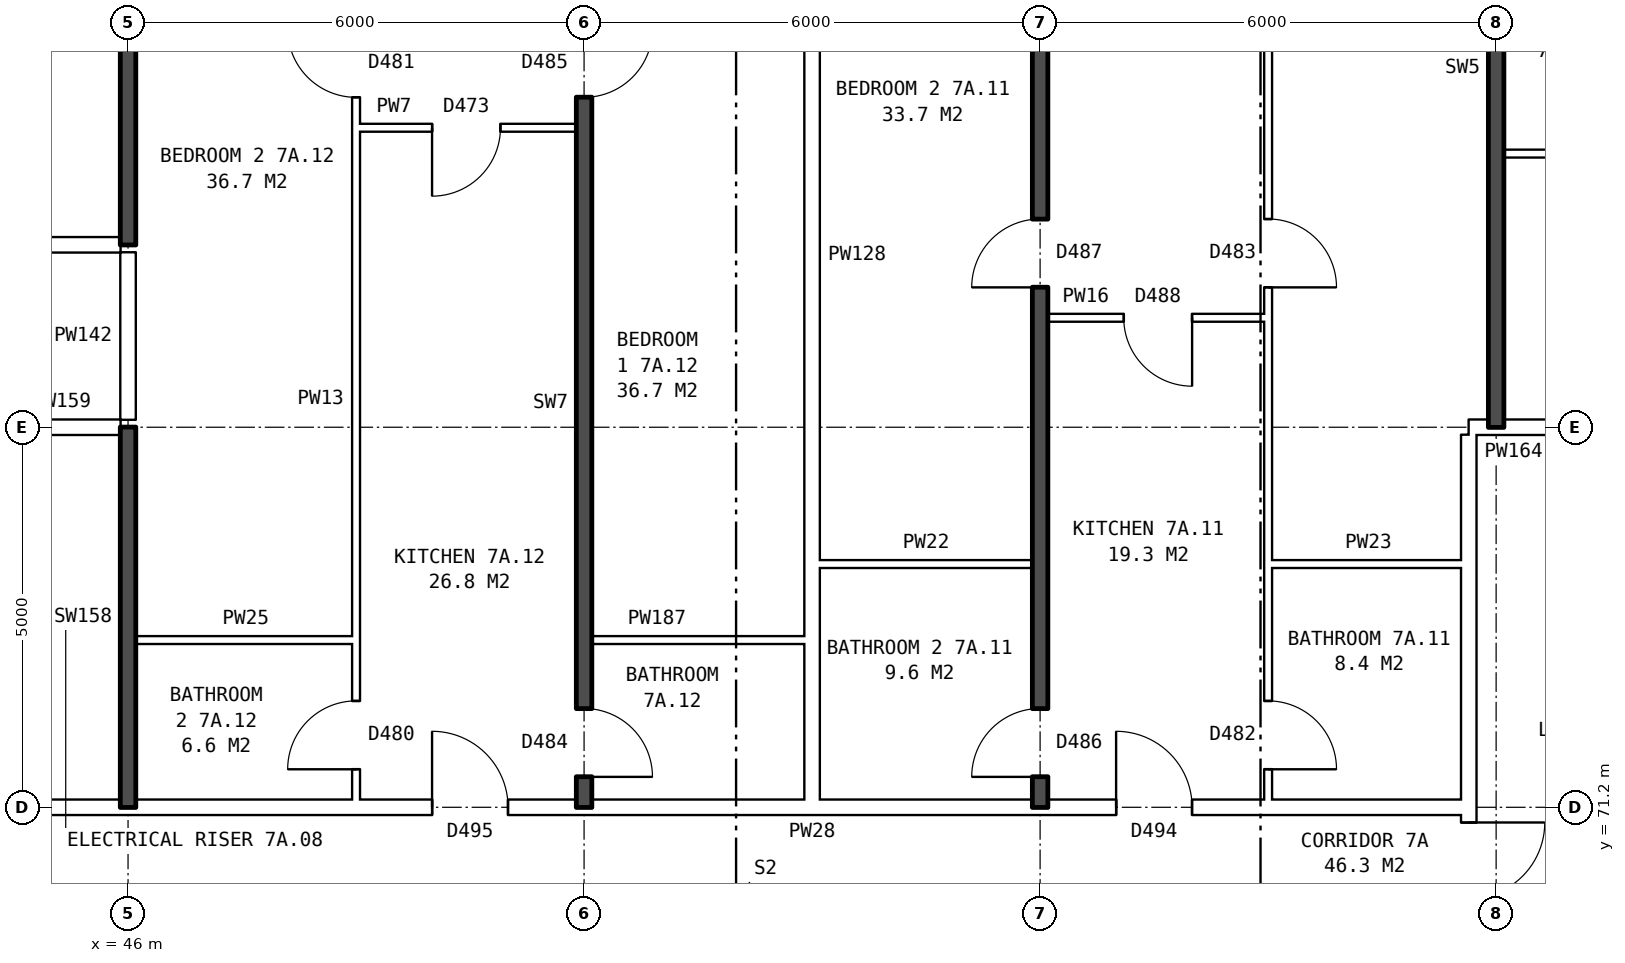
"""IFC4 building model, lengths in metres.
Left out: names, types, materials, properties, quantities, classifications, styles, units other than length and angle.
Written with IfcOpenShell. Run it as: python <this file> out.ifc"""

import sys

from ifc_helpers import new_model, si_unit, direction, frame, frame_2d, origin, place, context, subcontext, project, spatial, rectangle, extrude, element, fill, save


model = new_model("IFC4")
c1 = context("Model", 3, precision=1e-05, world=origin(), true_north=direction((0.0, 1.0)))
c2 = subcontext(c1, "Body", "Model", "MODEL_VIEW")
j1 = project(units=[si_unit("LENGTHUNIT", "METRE"), si_unit("PLANEANGLEUNIT", "RADIAN")], contexts=[c1])
p1 = place(None, origin())
s1 = spatial("IfcSite", under=j1, at=p1, CompositionType="ELEMENT")
p2 = place(p1, origin())
s2 = spatial("IfcBuilding", under=s1, at=p2, CompositionType="ELEMENT")
p3 = place(p2, frame((0.0, 0.0, 28.8)))
s3 = spatial("IfcBuildingStorey", under=s2, at=p3, CompositionType="ELEMENT", Elevation=28.8)
p4 = place(p3, frame((63.64, 63.9, 0.0), z_axis=(0.0, 0.0, 1.0), x_axis=(0.0, 1.0, 0.0)))
e1 = element("IfcWall", 1, at=p4, inside=s3, PredefinedType="PARTITIONING", context=c2, shape_type="SweptSolid", body=[
    extrude(rectangle(XDim=12.2, YDim=0.2, at=frame_2d((6.1, 0.0))), origin(), (0.0, 0.0, 1.0), 2.85),
])
p5 = place(p4, frame((5.1, 0.0, 0.0)))
e2 = element("IfcOpeningElement", 2, at=p5, cuts=e1, PredefinedType="OPENING", context=c2, shape_type="SweptSolid", body=[
    extrude(rectangle(XDim=2.0, YDim=2.1, at=frame_2d((1.0, 1.05))), frame((0.0, 0.11, 0.0), z_axis=(0.0, -1.0, 0.0), x_axis=(1.0, 0.0, 0.0)), (0.0, 0.0, 1.0), 0.22),
])
p6 = place(p3, frame((44.36, 71.2, 0.0), z_axis=(0.0, 0.0, 1.0), x_axis=(1.0, 0.0, 0.0)))
e3 = element("IfcWall", 3, at=p6, inside=s3, PredefinedType="PARTITIONING", context=c2, shape_type="SweptSolid", body=[
    extrude(rectangle(XDim=19.28, YDim=0.2, at=frame_2d((9.64, 0.0))), origin(), (0.0, 0.0, 1.0), 2.85),
])
p7 = place(p6, frame((14.64, 0.0, 0.0)))
e4 = element("IfcOpeningElement", 4, at=p7, cuts=e3, PredefinedType="OPENING", context=c2, shape_type="SweptSolid", body=[
    extrude(rectangle(XDim=1.0, YDim=2.1, at=frame_2d((0.5, 1.05))), frame((0.0, 0.11, 0.0), z_axis=(0.0, -1.0, 0.0), x_axis=(1.0, 0.0, 0.0)), (0.0, 0.0, 1.0), 0.22),
])
p8 = place(p6, frame((5.64, 0.0, 0.0)))
e5 = element("IfcOpeningElement", 5, at=p8, cuts=e3, PredefinedType="OPENING", context=c2, shape_type="SweptSolid", body=[
    extrude(rectangle(XDim=1.0, YDim=2.1, at=frame_2d((0.5, 1.05))), frame((0.0, 0.11, 0.0), z_axis=(0.0, -1.0, 0.0), x_axis=(1.0, 0.0, 0.0)), (0.0, 0.0, 1.0), 0.22),
])
p9 = place(p3, frame((46.1, 73.4, 0.0), z_axis=(0.0, 0.0, 1.0), x_axis=(1.0, 0.0, 0.0)))
e6 = element("IfcWall", 6, at=p9, inside=s3, PredefinedType="PARTITIONING", context=c2, shape_type="SweptSolid", body=[
    extrude(rectangle(XDim=2.9, YDim=0.1, at=frame_2d((1.45, 0.0))), origin(), (0.0, 0.0, 1.0), 2.85),
])
for number, where, z_axis, x_axis in (
    (7, (52.1, 73.4, 0.0), (0.0, 0.0, 1.0), (1.0, 0.0, 0.0)),
    (8, (55.1, 74.4, 0.0), (0.0, 0.0, 1.0), (1.0, 0.0, 0.0)),
):
    element("IfcWall", number, at=place(p3, frame(where, z_axis=z_axis, x_axis=x_axis)), inside=s3, PredefinedType="PARTITIONING", context=c2, shape_type="SweptSolid", body=[
        extrude(rectangle(XDim=2.8, YDim=0.1, at=frame_2d((1.4, 0.0))), origin(), (0.0, 0.0, 1.0), 2.85),
    ])
p10 = place(p3, frame((61.0, 74.4, 0.0), z_axis=(0.0, 0.0, 1.0), x_axis=(1.0, 0.0, 0.0)))
e9 = element("IfcWall", 9, at=p10, inside=s3, PredefinedType="PARTITIONING", context=c2, shape_type="SweptSolid", body=[
    extrude(rectangle(XDim=2.64, YDim=0.1, at=frame_2d((1.32, 0.0))), origin(), (0.0, 0.0, 1.0), 2.85),
])
p11 = place(p3, frame((44.36, 76.2, 0.0), z_axis=(0.0, 0.0, 1.0), x_axis=(1.0, 0.0, 0.0)))
e10 = element("IfcWall", 10, at=p11, inside=s3, PredefinedType="PARTITIONING", context=c2, shape_type="SweptSolid", body=[
    extrude(rectangle(XDim=1.54, YDim=0.2, at=frame_2d((0.77, 0.0))), origin(), (0.0, 0.0, 1.0), 2.85),
])
p12 = place(p3, frame((63.64, 76.2, 0.0), z_axis=(0.0, 0.0, 1.0), x_axis=(1.0, 0.0, 0.0)))
e11 = element("IfcWall", 11, at=p12, inside=s3, PredefinedType="PARTITIONING", context=c2, shape_type="SweptSolid", body=[
    extrude(rectangle(XDim=3.0, YDim=0.2, at=frame_2d((1.5, 0.0))), origin(), (0.0, 0.0, 1.0), 2.85),
])
p13 = place(p12, frame((1.18, 0.0, 0.0)))
e12 = element("IfcOpeningElement", 12, at=p13, cuts=e11, PredefinedType="OPENING", context=c2, shape_type="SweptSolid", body=[
    extrude(rectangle(XDim=1.0, YDim=2.1, at=frame_2d((0.5, 1.05))), frame((0.0, 0.11, 0.0), z_axis=(0.0, -1.0, 0.0), x_axis=(1.0, 0.0, 0.0)), (0.0, 0.0, 1.0), 0.22),
])
p14 = place(p3, frame((58.1, 77.64, 0.0), z_axis=(0.0, 0.0, 1.0), x_axis=(1.0, 0.0, 0.0)))
e13 = element("IfcWall", 13, at=p14, inside=s3, PredefinedType="PARTITIONING", context=c2, shape_type="SweptSolid", body=[
    extrude(rectangle(XDim=2.9, YDim=0.1, at=frame_2d((1.45, 0.0))), origin(), (0.0, 0.0, 1.0), 2.85),
])
p15 = place(p14, frame((1.0, 0.0, 0.0)))
e14 = element("IfcOpeningElement", 14, at=p15, cuts=e13, PredefinedType="OPENING", context=c2, shape_type="SweptSolid", body=[
    extrude(rectangle(XDim=0.9, YDim=2.1, at=frame_2d((0.45, 1.05))), frame((0.0, 0.06, 0.0), z_axis=(0.0, -1.0, 0.0), x_axis=(1.0, 0.0, 0.0)), (0.0, 0.0, 1.0), 0.12),
])
p16 = place(p3, frame((20.11, 78.6, 0.0), z_axis=(0.0, 0.0, 1.0), x_axis=(1.0, 0.0, 0.0)))
e15 = element("IfcWall", 15, at=p16, inside=s3, PredefinedType="PARTITIONING", context=c2, shape_type="SweptSolid", body=[
    extrude(rectangle(XDim=25.79, YDim=0.2, at=frame_2d((12.895, 0.0))), origin(), (0.0, 0.0, 1.0), 2.85),
])
p17 = place(p16, frame((22.34, 0.0, 0.0)))
e16 = element("IfcOpeningElement", 16, at=p17, cuts=e15, PredefinedType="OPENING", context=c2, shape_type="SweptSolid", body=[
    extrude(rectangle(XDim=1.0, YDim=2.1, at=frame_2d((0.5, 1.05))), frame((0.0, 0.11, 0.0), z_axis=(0.0, -1.0, 0.0), x_axis=(1.0, 0.0, 0.0)), (0.0, 0.0, 1.0), 0.22),
])
p18 = place(p16, frame((10.39, 0.0, 0.0)))
e17 = element("IfcOpeningElement", 17, at=p18, cuts=e15, PredefinedType="OPENING", context=c2, shape_type="SweptSolid", body=[
    extrude(rectangle(XDim=1.0, YDim=2.1, at=frame_2d((0.5, 1.05))), frame((0.0, 0.11, 0.0), z_axis=(0.0, -1.0, 0.0), x_axis=(1.0, 0.0, 0.0)), (0.0, 0.0, 1.0), 0.22),
])
p19 = place(p16, frame((2.245, 0.0, 0.0)))
e18 = element("IfcOpeningElement", 18, at=p19, cuts=e15, PredefinedType="OPENING", context=c2, shape_type="SweptSolid", body=[
    extrude(rectangle(XDim=1.0, YDim=2.1, at=frame_2d((0.5, 1.05))), frame((0.0, 0.11, 0.0), z_axis=(0.0, -1.0, 0.0), x_axis=(1.0, 0.0, 0.0)), (0.0, 0.0, 1.0), 0.22),
])
p20 = place(p3, frame((64.1, 79.8, 0.0), z_axis=(0.0, 0.0, 1.0), x_axis=(1.0, 0.0, 0.0)))
e19 = element("IfcWall", 19, at=p20, inside=s3, PredefinedType="PARTITIONING", context=c2, shape_type="SweptSolid", body=[
    extrude(rectangle(XDim=5.8, YDim=0.1, at=frame_2d((2.9, 0.0))), origin(), (0.0, 0.0, 1.0), 2.85),
])
p21 = place(p20, frame((3.6, 0.0, 0.0)))
e20 = element("IfcOpeningElement", 20, at=p21, cuts=e19, PredefinedType="OPENING", context=c2, shape_type="SweptSolid", body=[
    extrude(rectangle(XDim=0.9, YDim=2.1, at=frame_2d((0.45, 1.05))), frame((0.0, 0.06, 0.0), z_axis=(0.0, -1.0, 0.0), x_axis=(1.0, 0.0, 0.0)), (0.0, 0.0, 1.0), 0.12),
])
p22 = place(p20, frame((0.7, 0.0, 0.0)))
e21 = element("IfcOpeningElement", 21, at=p22, cuts=e19, PredefinedType="OPENING", context=c2, shape_type="SweptSolid", body=[
    extrude(rectangle(XDim=0.9, YDim=2.1, at=frame_2d((0.45, 1.05))), frame((0.0, 0.06, 0.0), z_axis=(0.0, -1.0, 0.0), x_axis=(1.0, 0.0, 0.0)), (0.0, 0.0, 1.0), 0.12),
])
p23 = place(p3, frame((49.0, 80.14, 0.0), z_axis=(0.0, 0.0, 1.0), x_axis=(1.0, 0.0, 0.0)))
e22 = element("IfcWall", 22, at=p23, inside=s3, PredefinedType="PARTITIONING", context=c2, shape_type="SweptSolid", body=[
    extrude(rectangle(XDim=2.9, YDim=0.1, at=frame_2d((1.45, 0.0))), origin(), (0.0, 0.0, 1.0), 2.85),
])
p24 = place(p23, frame((1.0, 0.0, 0.0)))
e23 = element("IfcOpeningElement", 23, at=p24, cuts=e22, PredefinedType="OPENING", context=c2, shape_type="SweptSolid", body=[
    extrude(rectangle(XDim=0.9, YDim=2.1, at=frame_2d((0.45, 1.05))), frame((0.0, 0.06, 0.0), z_axis=(0.0, -1.0, 0.0), x_axis=(1.0, 0.0, 0.0)), (0.0, 0.0, 1.0), 0.12),
])
p25 = place(p3, frame((46.0, 71.2, 0.0), z_axis=(0.0, 0.0, 1.0), x_axis=(0.0, 1.0, 0.0)))
e24 = element("IfcWall", 24, at=p25, inside=s3, PredefinedType="SOLIDWALL", context=c2, shape_type="SweptSolid", body=[
    extrude(rectangle(XDim=5.0, YDim=0.2, at=frame_2d((2.5, 0.0))), origin(), (0.0, 0.0, 1.0), 2.85),
])
p26 = place(p3, frame((46.0, 76.3, 0.0), z_axis=(0.0, 0.0, 1.0), x_axis=(0.0, 1.0, 0.0)))
e25 = element("IfcWall", 25, at=p26, inside=s3, PredefinedType="PARTITIONING", context=c2, shape_type="SweptSolid", body=[
    extrude(rectangle(XDim=2.2, YDim=0.2, at=frame_2d((1.1, 0.0))), origin(), (0.0, 0.0, 1.0), 2.85),
])
p27 = place(p3, frame((46.0, 78.6, 0.0), z_axis=(0.0, 0.0, 1.0), x_axis=(0.0, 1.0, 0.0)))
e26 = element("IfcWall", 26, at=p27, inside=s3, PredefinedType="SOLIDWALL", context=c2, shape_type="SweptSolid", body=[
    extrude(rectangle(XDim=7.04, YDim=0.2, at=frame_2d((3.52, 0.0))), origin(), (0.0, 0.0, 1.0), 2.85),
])
p28 = place(p3, frame((49.0, 71.3, 0.0), z_axis=(0.0, 0.0, 1.0), x_axis=(0.0, 1.0, 0.0)))
e27 = element("IfcWall", 27, at=p28, inside=s3, PredefinedType="PARTITIONING", context=c2, shape_type="SweptSolid", body=[
    extrude(rectangle(XDim=14.34, YDim=0.1, at=frame_2d((7.17, 0.0))), origin(), (0.0, 0.0, 1.0), 2.85),
])
p29 = place(p28, frame((9.24, 0.0, 0.0)))
e28 = element("IfcOpeningElement", 28, at=p29, cuts=e27, PredefinedType="OPENING", context=c2, shape_type="SweptSolid", body=[
    extrude(rectangle(XDim=0.9, YDim=2.1, at=frame_2d((0.45, 1.05))), frame((0.0, 0.06, 0.0), z_axis=(0.0, -1.0, 0.0), x_axis=(1.0, 0.0, 0.0)), (0.0, 0.0, 1.0), 0.12),
])
p30 = place(p28, frame((0.4, 0.0, 0.0)))
e29 = element("IfcOpeningElement", 29, at=p30, cuts=e27, PredefinedType="OPENING", context=c2, shape_type="SweptSolid", body=[
    extrude(rectangle(XDim=0.9, YDim=2.1, at=frame_2d((0.45, 1.05))), frame((0.0, 0.06, 0.0), z_axis=(0.0, -1.0, 0.0), x_axis=(1.0, 0.0, 0.0)), (0.0, 0.0, 1.0), 0.12),
])
p31 = place(p3, frame((52.0, 71.2, 0.0), z_axis=(0.0, 0.0, 1.0), x_axis=(0.0, 1.0, 0.0)))
e30 = element("IfcWall", 30, at=p31, inside=s3, PredefinedType="SOLIDWALL", context=c2, shape_type="SweptSolid", body=[
    extrude(rectangle(XDim=14.44, YDim=0.2, at=frame_2d((7.22, 0.0))), origin(), (0.0, 0.0, 1.0), 2.85),
])
p32 = place(p31, frame((9.34, 0.0, 0.0)))
e31 = element("IfcOpeningElement", 31, at=p32, cuts=e30, PredefinedType="OPENING", context=c2, shape_type="SweptSolid", body=[
    extrude(rectangle(XDim=0.9, YDim=2.1, at=frame_2d((0.45, 1.05))), frame((0.0, 0.11, 0.0), z_axis=(0.0, -1.0, 0.0), x_axis=(1.0, 0.0, 0.0)), (0.0, 0.0, 1.0), 0.22),
])
p33 = place(p31, frame((0.4, 0.0, 0.0)))
e32 = element("IfcOpeningElement", 32, at=p33, cuts=e30, PredefinedType="OPENING", context=c2, shape_type="SweptSolid", body=[
    extrude(rectangle(XDim=0.9, YDim=2.1, at=frame_2d((0.45, 1.05))), frame((0.0, 0.11, 0.0), z_axis=(0.0, -1.0, 0.0), x_axis=(1.0, 0.0, 0.0)), (0.0, 0.0, 1.0), 0.22),
])
p34 = place(p3, frame((55.0, 71.3, 0.0), z_axis=(0.0, 0.0, 1.0), x_axis=(0.0, 1.0, 0.0)))
e33 = element("IfcWall", 33, at=p34, inside=s3, PredefinedType="PARTITIONING", context=c2, shape_type="SweptSolid", body=[
    extrude(rectangle(XDim=14.34, YDim=0.2, at=frame_2d((7.17, 0.0))), origin(), (0.0, 0.0, 1.0), 2.85),
])
p35 = place(p3, frame((58.0, 71.2, 0.0), z_axis=(0.0, 0.0, 1.0), x_axis=(0.0, 1.0, 0.0)))
e34 = element("IfcWall", 34, at=p35, inside=s3, PredefinedType="SOLIDWALL", context=c2, shape_type="SweptSolid", body=[
    extrude(rectangle(XDim=14.44, YDim=0.2, at=frame_2d((7.22, 0.0))), origin(), (0.0, 0.0, 1.0), 2.85),
])
p36 = place(p35, frame((6.84, 0.0, 0.0)))
e35 = element("IfcOpeningElement", 35, at=p36, cuts=e34, PredefinedType="OPENING", context=c2, shape_type="SweptSolid", body=[
    extrude(rectangle(XDim=0.9, YDim=2.1, at=frame_2d((0.45, 1.05))), frame((0.0, 0.11, 0.0), z_axis=(0.0, -1.0, 0.0), x_axis=(1.0, 0.0, 0.0)), (0.0, 0.0, 1.0), 0.22),
])
p37 = place(p35, frame((0.4, 0.0, 0.0)))
e36 = element("IfcOpeningElement", 36, at=p37, cuts=e34, PredefinedType="OPENING", context=c2, shape_type="SweptSolid", body=[
    extrude(rectangle(XDim=0.9, YDim=2.1, at=frame_2d((0.45, 1.05))), frame((0.0, 0.11, 0.0), z_axis=(0.0, -1.0, 0.0), x_axis=(1.0, 0.0, 0.0)), (0.0, 0.0, 1.0), 0.22),
])
p38 = place(p3, frame((61.0, 71.3, 0.0), z_axis=(0.0, 0.0, 1.0), x_axis=(0.0, 1.0, 0.0)))
e37 = element("IfcWall", 37, at=p38, inside=s3, PredefinedType="PARTITIONING", context=c2, shape_type="SweptSolid", body=[
    extrude(rectangle(XDim=14.34, YDim=0.1, at=frame_2d((7.17, 0.0))), origin(), (0.0, 0.0, 1.0), 2.85),
])
p39 = place(p38, frame((6.74, 0.0, 0.0)))
e38 = element("IfcOpeningElement", 38, at=p39, cuts=e37, PredefinedType="OPENING", context=c2, shape_type="SweptSolid", body=[
    extrude(rectangle(XDim=0.9, YDim=2.1, at=frame_2d((0.45, 1.05))), frame((0.0, 0.06, 0.0), z_axis=(0.0, -1.0, 0.0), x_axis=(1.0, 0.0, 0.0)), (0.0, 0.0, 1.0), 0.12),
])
p40 = place(p38, frame((0.4, 0.0, 0.0)))
e39 = element("IfcOpeningElement", 39, at=p40, cuts=e37, PredefinedType="OPENING", context=c2, shape_type="SweptSolid", body=[
    extrude(rectangle(XDim=0.9, YDim=2.1, at=frame_2d((0.45, 1.05))), frame((0.0, 0.06, 0.0), z_axis=(0.0, -1.0, 0.0), x_axis=(1.0, 0.0, 0.0)), (0.0, 0.0, 1.0), 0.12),
])
p41 = place(p3, frame((64.0, 76.2, 0.0), z_axis=(0.0, 0.0, 1.0), x_axis=(0.0, 1.0, 0.0)))
e40 = element("IfcWall", 40, at=p41, inside=s3, PredefinedType="SOLIDWALL", context=c2, shape_type="SweptSolid", body=[
    extrude(rectangle(XDim=9.44, YDim=0.2, at=frame_2d((4.72, 0.0))), origin(), (0.0, 0.0, 1.0), 2.85),
])
p42 = place(p5, frame((2.0, 0.0, 0.0), z_axis=(0.0, 0.0, 1.0), x_axis=(-1.0, 0.0, 0.0)))
e41 = element("IfcDoor", 41, at=p42, inside=s3, OperationType="DOUBLE_DOOR_SINGLE_SWING", PredefinedType="DOOR", context=c2, shape_type="SweptSolid", body=[
    extrude(rectangle(XDim=2.0, YDim=2.1, at=frame_2d((1.0, 1.05))), frame((0.0, 0.025, 0.0), z_axis=(0.0, -1.0, 0.0), x_axis=(1.0, 0.0, 0.0)), (0.0, 0.0, 1.0), 0.05),
])
fill(e2, e41)
p43 = place(p39, frame((0.9, 0.0, 0.0), z_axis=(0.0, 0.0, 1.0), x_axis=(-1.0, 0.0, 0.0)))
e42 = element("IfcDoor", 42, at=p43, inside=s3, OperationType="SINGLE_SWING_RIGHT", PredefinedType="DOOR", context=c2, shape_type="SweptSolid", body=[
    extrude(rectangle(XDim=0.9, YDim=2.1, at=frame_2d((0.45, 1.05))), frame((0.0, 0.025, 0.0), z_axis=(0.0, -1.0, 0.0), x_axis=(1.0, 0.0, 0.0)), (0.0, 0.0, 1.0), 0.05),
])
fill(e38, e42)
p44 = place(p36, origin())
e43 = element("IfcDoor", 43, at=p44, inside=s3, OperationType="SINGLE_SWING_LEFT", PredefinedType="DOOR", context=c2, shape_type="SweptSolid", body=[
    extrude(rectangle(XDim=0.9, YDim=2.1, at=frame_2d((0.45, 1.05))), frame((0.0, 0.025, 0.0), z_axis=(0.0, -1.0, 0.0), x_axis=(1.0, 0.0, 0.0)), (0.0, 0.0, 1.0), 0.05),
])
fill(e35, e43)
p45 = place(p7, origin())
e44 = element("IfcDoor", 44, at=p45, inside=s3, OperationType="SINGLE_SWING_LEFT", PredefinedType="DOOR", context=c2, shape_type="SweptSolid", body=[
    extrude(rectangle(XDim=1.0, YDim=2.1, at=frame_2d((0.5, 1.05))), frame((0.0, 0.025, 0.0), z_axis=(0.0, -1.0, 0.0), x_axis=(1.0, 0.0, 0.0)), (0.0, 0.0, 1.0), 0.05),
])
fill(e4, e44)
p46 = place(p15, frame((0.9, 0.0, 0.0), z_axis=(0.0, 0.0, 1.0), x_axis=(-1.0, 0.0, 0.0)))
e45 = element("IfcDoor", 45, at=p46, inside=s3, OperationType="SINGLE_SWING_LEFT", PredefinedType="DOOR", context=c2, shape_type="SweptSolid", body=[
    extrude(rectangle(XDim=0.9, YDim=2.1, at=frame_2d((0.45, 1.05))), frame((0.0, 0.025, 0.0), z_axis=(0.0, -1.0, 0.0), x_axis=(1.0, 0.0, 0.0)), (0.0, 0.0, 1.0), 0.05),
])
fill(e14, e45)
p47 = place(p40, frame((0.9, 0.0, 0.0), z_axis=(0.0, 0.0, 1.0), x_axis=(-1.0, 0.0, 0.0)))
e46 = element("IfcDoor", 46, at=p47, inside=s3, OperationType="SINGLE_SWING_RIGHT", PredefinedType="DOOR", context=c2, shape_type="SweptSolid", body=[
    extrude(rectangle(XDim=0.9, YDim=2.1, at=frame_2d((0.45, 1.05))), frame((0.0, 0.025, 0.0), z_axis=(0.0, -1.0, 0.0), x_axis=(1.0, 0.0, 0.0)), (0.0, 0.0, 1.0), 0.05),
])
fill(e39, e46)
p48 = place(p37, origin())
e47 = element("IfcDoor", 47, at=p48, inside=s3, OperationType="SINGLE_SWING_LEFT", PredefinedType="DOOR", context=c2, shape_type="SweptSolid", body=[
    extrude(rectangle(XDim=0.9, YDim=2.1, at=frame_2d((0.45, 1.05))), frame((0.0, 0.025, 0.0), z_axis=(0.0, -1.0, 0.0), x_axis=(1.0, 0.0, 0.0)), (0.0, 0.0, 1.0), 0.05),
])
fill(e36, e47)
p49 = place(p32, frame((0.9, 0.0, 0.0), z_axis=(0.0, 0.0, 1.0), x_axis=(-1.0, 0.0, 0.0)))
e48 = element("IfcDoor", 48, at=p49, inside=s3, OperationType="SINGLE_SWING_LEFT", PredefinedType="DOOR", context=c2, shape_type="SweptSolid", body=[
    extrude(rectangle(XDim=0.9, YDim=2.1, at=frame_2d((0.45, 1.05))), frame((0.0, 0.025, 0.0), z_axis=(0.0, -1.0, 0.0), x_axis=(1.0, 0.0, 0.0)), (0.0, 0.0, 1.0), 0.05),
])
fill(e31, e48)
p50 = place(p29, origin())
e49 = element("IfcDoor", 49, at=p50, inside=s3, OperationType="SINGLE_SWING_RIGHT", PredefinedType="DOOR", context=c2, shape_type="SweptSolid", body=[
    extrude(rectangle(XDim=0.9, YDim=2.1, at=frame_2d((0.45, 1.05))), frame((0.0, 0.025, 0.0), z_axis=(0.0, -1.0, 0.0), x_axis=(1.0, 0.0, 0.0)), (0.0, 0.0, 1.0), 0.05),
])
fill(e28, e49)
p51 = place(p8, origin())
e50 = element("IfcDoor", 50, at=p51, inside=s3, OperationType="SINGLE_SWING_LEFT", PredefinedType="DOOR", context=c2, shape_type="SweptSolid", body=[
    extrude(rectangle(XDim=1.0, YDim=2.1, at=frame_2d((0.5, 1.05))), frame((0.0, 0.025, 0.0), z_axis=(0.0, -1.0, 0.0), x_axis=(1.0, 0.0, 0.0)), (0.0, 0.0, 1.0), 0.05),
])
fill(e5, e50)
p52 = place(p24, frame((0.9, 0.0, 0.0), z_axis=(0.0, 0.0, 1.0), x_axis=(-1.0, 0.0, 0.0)))
e51 = element("IfcDoor", 51, at=p52, inside=s3, OperationType="SINGLE_SWING_RIGHT", PredefinedType="DOOR", context=c2, shape_type="SweptSolid", body=[
    extrude(rectangle(XDim=0.9, YDim=2.1, at=frame_2d((0.45, 1.05))), frame((0.0, 0.025, 0.0), z_axis=(0.0, -1.0, 0.0), x_axis=(1.0, 0.0, 0.0)), (0.0, 0.0, 1.0), 0.05),
])
fill(e23, e51)
p53 = place(p33, frame((0.9, 0.0, 0.0), z_axis=(0.0, 0.0, 1.0), x_axis=(-1.0, 0.0, 0.0)))
e52 = element("IfcDoor", 52, at=p53, inside=s3, OperationType="SINGLE_SWING_RIGHT", PredefinedType="DOOR", context=c2, shape_type="SweptSolid", body=[
    extrude(rectangle(XDim=0.9, YDim=2.1, at=frame_2d((0.45, 1.05))), frame((0.0, 0.025, 0.0), z_axis=(0.0, -1.0, 0.0), x_axis=(1.0, 0.0, 0.0)), (0.0, 0.0, 1.0), 0.05),
])
fill(e32, e52)
p54 = place(p30, origin())
e53 = element("IfcDoor", 53, at=p54, inside=s3, OperationType="SINGLE_SWING_LEFT", PredefinedType="DOOR", context=c2, shape_type="SweptSolid", body=[
    extrude(rectangle(XDim=0.9, YDim=2.1, at=frame_2d((0.45, 1.05))), frame((0.0, 0.025, 0.0), z_axis=(0.0, -1.0, 0.0), x_axis=(1.0, 0.0, 0.0)), (0.0, 0.0, 1.0), 0.05),
])
fill(e29, e53)
save(model, sys.argv[1])
